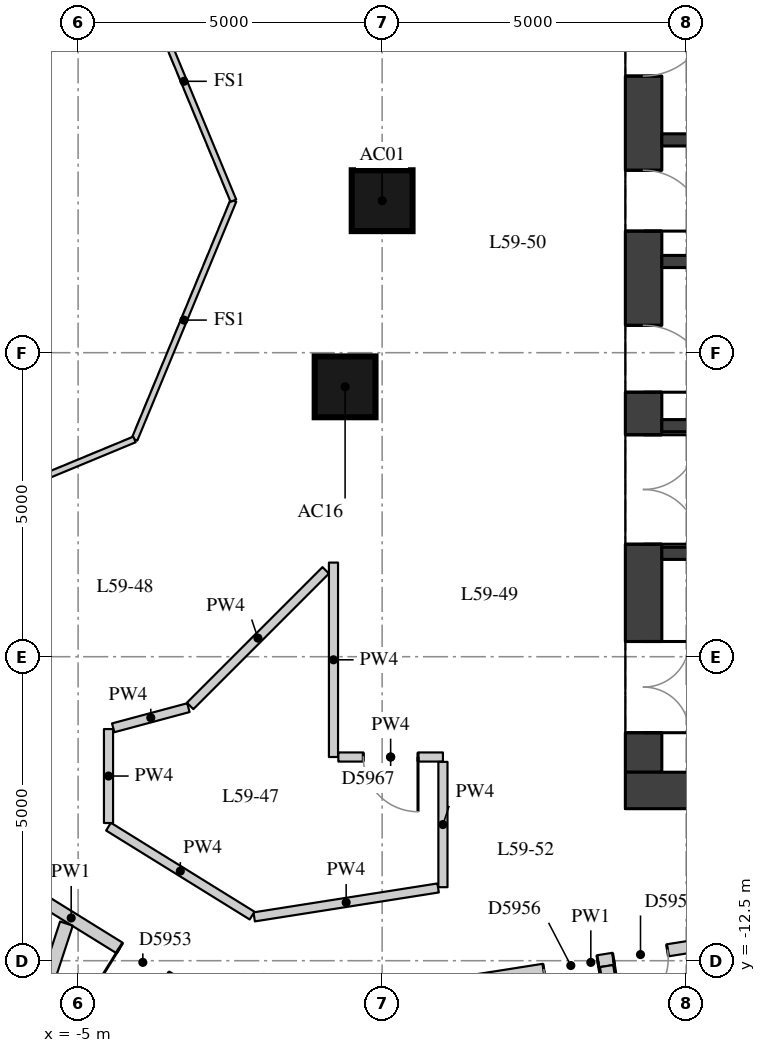
"""IFC4 building model, lengths in metres.
Left out: names, types, materials, properties, quantities, classifications, styles, units other than length and angle.
Written with IfcOpenShell. Run it as: python <this file> out.ifc"""

import sys

from ifc_helpers import new_model, si_unit, direction, frame, frame_2d, origin, origin_2d, place, context, subcontext, project, spatial, rectangle, extrude, element, fill, save


model = new_model("IFC4")
c1 = context("Model", 3, precision=1e-05, world=origin(), true_north=direction((0.0, 1.0)))
c2 = subcontext(c1, "Body", "Model", "MODEL_VIEW")
j1 = project(units=[si_unit("LENGTHUNIT", "METRE"), si_unit("PLANEANGLEUNIT", "RADIAN")], contexts=[c1])
p1 = place(None, origin())
s1 = spatial("IfcSite", under=j1, at=p1, CompositionType="ELEMENT")
p2 = place(p1, origin())
s2 = spatial("IfcBuilding", under=s1, at=p2, CompositionType="ELEMENT")
p3 = place(p2, frame((0.0, 0.0, 209.0)))
s3 = spatial("IfcBuildingStorey", under=s2, at=p3, CompositionType="ELEMENT", Elevation=209.0)
for number, where, z_axis, x_axis in (
    (1, (0.0, 0.0, 0.0), (0.0, 0.0, 1.0), (1.0, 0.0, 0.0)),
    (2, (-0.609, -3.062, 0.0), (0.0, 0.0, 1.0), (1.0, 0.0, 0.0)),
):
    element("IfcColumn", number, at=place(p3, frame(where, z_axis=z_axis, x_axis=x_axis)), inside=s3, PredefinedType="COLUMN", context=c2, shape_type="SweptSolid", body=[
        extrude(rectangle(XDim=1.0, YDim=1.0, at=origin_2d()), origin(), (0.0, 0.0, 1.0), 3.3),
    ])
p4 = place(p3, frame((4.3, -9.4, 0.0), z_axis=(0.0, 0.0, 1.0), x_axis=(0.0, 1.0, 0.0)))
e3 = element("IfcWall", 3, at=p4, inside=s3, PredefinedType="SHEAR", context=c2, shape_type="SweptSolid", body=[
    extrude(rectangle(XDim=18.8, YDim=0.6, at=frame_2d((9.4, 0.0))), origin(), (0.0, 0.0, 1.0), 3.02),
])
p5 = place(p4, frame((0.65, 0.0, 0.0)))
e4 = element("IfcOpeningElement", 4, at=p5, cuts=e3, PredefinedType="OPENING", context=c2, shape_type="SweptSolid", body=[
    extrude(rectangle(XDim=1.5, YDim=2.1, at=frame_2d((0.75, 1.05))), frame((0.0, 0.31, 0.0), z_axis=(0.0, -1.0, 0.0), x_axis=(1.0, 0.0, 0.0)), (0.0, 0.0, 1.0), 0.62),
])
p6 = place(p4, frame((3.75, 0.0, 0.0)))
e5 = element("IfcOpeningElement", 5, at=p6, cuts=e3, PredefinedType="OPENING", context=c2, shape_type="SweptSolid", body=[
    extrude(rectangle(XDim=1.8, YDim=2.1, at=frame_2d((0.9, 1.05))), frame((0.0, 0.31, 0.0), z_axis=(0.0, -1.0, 0.0), x_axis=(1.0, 0.0, 0.0)), (0.0, 0.0, 1.0), 0.62),
])
p7 = place(p4, frame((6.25, 0.0, 0.0)))
e6 = element("IfcOpeningElement", 6, at=p7, cuts=e3, PredefinedType="OPENING", context=c2, shape_type="SweptSolid", body=[
    extrude(rectangle(XDim=1.1, YDim=2.1, at=frame_2d((0.55, 1.05))), frame((0.0, 0.31, 0.0), z_axis=(0.0, -1.0, 0.0), x_axis=(1.0, 0.0, 0.0)), (0.0, 0.0, 1.0), 0.62),
])
p8 = place(p4, frame((8.9, 0.0, 0.0)))
e7 = element("IfcOpeningElement", 7, at=p8, cuts=e3, PredefinedType="OPENING", context=c2, shape_type="SweptSolid", body=[
    extrude(rectangle(XDim=1.0, YDim=2.1, at=frame_2d((0.5, 1.05))), frame((0.0, 0.31, 0.0), z_axis=(0.0, -1.0, 0.0), x_axis=(1.0, 0.0, 0.0)), (0.0, 0.0, 1.0), 0.62),
])
p9 = place(p4, frame((11.45, 0.0, 0.0)))
e8 = element("IfcOpeningElement", 8, at=p9, cuts=e3, PredefinedType="OPENING", context=c2, shape_type="SweptSolid", body=[
    extrude(rectangle(XDim=1.1, YDim=2.1, at=frame_2d((0.55, 1.05))), frame((0.0, 0.31, 0.0), z_axis=(0.0, -1.0, 0.0), x_axis=(1.0, 0.0, 0.0)), (0.0, 0.0, 1.0), 0.62),
])
p10 = place(p4, frame((13.25, 0.0, 0.0)))
e9 = element("IfcOpeningElement", 9, at=p10, cuts=e3, PredefinedType="OPENING", context=c2, shape_type="SweptSolid", body=[
    extrude(rectangle(XDim=1.8, YDim=2.1, at=frame_2d((0.9, 1.05))), frame((0.0, 0.31, 0.0), z_axis=(0.0, -1.0, 0.0), x_axis=(1.0, 0.0, 0.0)), (0.0, 0.0, 1.0), 0.62),
])
p11 = place(p4, frame((16.65, 0.0, 0.0)))
e10 = element("IfcOpeningElement", 10, at=p11, cuts=e3, PredefinedType="OPENING", context=c2, shape_type="SweptSolid", body=[
    extrude(rectangle(XDim=1.5, YDim=2.1, at=frame_2d((0.75, 1.05))), frame((0.0, 0.31, 0.0), z_axis=(0.0, -1.0, 0.0), x_axis=(1.0, 0.0, 0.0)), (0.0, 0.0, 1.0), 0.62),
])
p12 = place(p3, frame((4.0, -9.7, 0.0), z_axis=(0.0, 0.0, 1.0), x_axis=(1.0, 0.0, 0.0)))
e11 = element("IfcWall", 11, at=p12, inside=s3, PredefinedType="SHEAR", context=c2, shape_type="SweptSolid", body=[
    extrude(rectangle(XDim=12.0, YDim=0.6, at=frame_2d((6.0, 0.0))), origin(), (0.0, 0.0, 1.0), 3.02),
])
for number, where, z_axis, x_axis in (
    (12, (4.6, 1.0, 0.0), (0.0, 0.0, 1.0), (1.0, 0.0, 0.0)),
    (13, (4.6, -1.0, 0.0), (0.0, 0.0, 1.0), (1.0, 0.0, 0.0)),
):
    element("IfcWall", number, at=place(p3, frame(where, z_axis=z_axis, x_axis=x_axis)), inside=s3, PredefinedType="SHEAR", context=c2, shape_type="SweptSolid", body=[
        extrude(rectangle(XDim=10.8, YDim=0.2, at=frame_2d((5.4, 0.0))), origin(), (0.0, 0.0, 1.0), 3.02),
    ])
p13 = place(p3, frame((4.6, -3.7, 0.0), z_axis=(0.0, 0.0, 1.0), x_axis=(1.0, 0.0, 0.0)))
e14 = element("IfcWall", 14, at=p13, inside=s3, PredefinedType="SHEAR", context=c2, shape_type="SweptSolid", body=[
    extrude(rectangle(XDim=10.8, YDim=0.2, at=frame_2d((5.4, 0.0))), origin(), (0.0, 0.0, 1.0), 3.02),
])
p14 = place(p13, frame((6.6, 0.0, 0.0)))
e15 = element("IfcOpeningElement", 15, at=p14, cuts=e14, PredefinedType="OPENING", context=c2, shape_type="SweptSolid", body=[
    extrude(rectangle(XDim=1.1, YDim=2.1, at=frame_2d((0.55, 1.05))), frame((0.0, 0.11, 0.0), z_axis=(0.0, -1.0, 0.0), x_axis=(1.0, 0.0, 0.0)), (0.0, 0.0, 1.0), 0.22),
])
p15 = place(p13, frame((8.9, 0.0, 0.0)))
e16 = element("IfcOpeningElement", 16, at=p15, cuts=e14, PredefinedType="OPENING", context=c2, shape_type="SweptSolid", body=[
    extrude(rectangle(XDim=1.1, YDim=2.1, at=frame_2d((0.55, 1.05))), frame((0.0, 0.11, 0.0), z_axis=(0.0, -1.0, 0.0), x_axis=(1.0, 0.0, 0.0)), (0.0, 0.0, 1.0), 0.22),
])
p16 = place(p3, frame((4.6, -5.8, 0.0), z_axis=(0.0, 0.0, 1.0), x_axis=(1.0, 0.0, 0.0)))
e17 = element("IfcWall", 17, at=p16, inside=s3, PredefinedType="SHEAR", context=c2, shape_type="SweptSolid", body=[
    extrude(rectangle(XDim=10.8, YDim=0.2, at=frame_2d((5.4, 0.0))), origin(), (0.0, 0.0, 1.0), 3.02),
])
p17 = place(p3, frame((9.306, -11.603, 0.0), z_axis=(0.0, 0.0, 1.0), x_axis=(-0.987842562114, -0.155457622769, 0.0)))
e18 = element("IfcWall", 18, at=p17, inside=s3, PredefinedType="PARTITIONING", context=c2, shape_type="SweptSolid", body=[
    extrude(rectangle(XDim=11.893, YDim=0.2, at=frame_2d((5.947, 0.0))), origin(), (0.0, 0.0, 1.0), 3.02),
])
p18 = place(p17, frame((10.607, 0.0, 0.0)))
e19 = element("IfcOpeningElement", 19, at=p18, cuts=e18, PredefinedType="OPENING", context=c2, shape_type="SweptSolid", body=[
    extrude(rectangle(XDim=0.9, YDim=2.1, at=frame_2d((0.45, 1.05))), frame((0.0, 0.11, 0.0), z_axis=(0.0, -1.0, 0.0), x_axis=(1.0, 0.0, 0.0)), (0.0, 0.0, 1.0), 0.22),
])
p19 = place(p17, frame((5.829, 0.0, 0.0)))
e20 = element("IfcOpeningElement", 20, at=p19, cuts=e18, PredefinedType="OPENING", context=c2, shape_type="SweptSolid", body=[
    extrude(rectangle(XDim=0.9, YDim=2.1, at=frame_2d((0.45, 1.05))), frame((0.0, 0.11, 0.0), z_axis=(0.0, -1.0, 0.0), x_axis=(1.0, 0.0, 0.0)), (0.0, 0.0, 1.0), 0.22),
])
p20 = place(p17, frame((4.669, 0.0, 0.0)))
e21 = element("IfcOpeningElement", 21, at=p20, cuts=e18, PredefinedType="OPENING", context=c2, shape_type="SweptSolid", body=[
    extrude(rectangle(XDim=0.9, YDim=2.1, at=frame_2d((0.45, 1.05))), frame((0.0, 0.11, 0.0), z_axis=(0.0, -1.0, 0.0), x_axis=(1.0, 0.0, 0.0)), (0.0, 0.0, 1.0), 0.22),
])
p21 = place(p17, frame((0.14, 0.0, 0.0)))
e22 = element("IfcOpeningElement", 22, at=p21, cuts=e18, PredefinedType="OPENING", context=c2, shape_type="SweptSolid", body=[
    extrude(rectangle(XDim=1.1, YDim=2.1, at=frame_2d((0.55, 1.05))), frame((0.0, 0.11, 0.0), z_axis=(0.0, -1.0, 0.0), x_axis=(1.0, 0.0, 0.0)), (0.0, 0.0, 1.0), 0.22),
])
p22 = place(p3, frame((-2.528, -13.4, 0.0), z_axis=(0.0, 0.0, 1.0), x_axis=(-0.850088088191, 0.526640524757, 0.0)))
e23 = element("IfcWall", 23, at=p22, inside=s3, PredefinedType="PARTITIONING", context=c2, shape_type="SweptSolid", body=[
    extrude(rectangle(XDim=6.084, YDim=0.2, at=frame_2d((3.042, 0.0))), origin(), (0.0, 0.0, 1.0), 3.02),
])
p23 = place(p22, frame((4.031, 0.0, 0.0)))
e24 = element("IfcOpeningElement", 24, at=p23, cuts=e23, PredefinedType="OPENING", context=c2, shape_type="SweptSolid", body=[
    extrude(rectangle(XDim=1.1, YDim=2.1, at=frame_2d((0.55, 1.05))), frame((0.0, 0.11, 0.0), z_axis=(0.0, -1.0, 0.0), x_axis=(1.0, 0.0, 0.0)), (0.0, 0.0, 1.0), 0.22),
])
p24 = place(p22, frame((1.206, 0.0, 0.0)))
e25 = element("IfcOpeningElement", 25, at=p24, cuts=e23, PredefinedType="OPENING", context=c2, shape_type="SweptSolid", body=[
    extrude(rectangle(XDim=0.9, YDim=2.1, at=frame_2d((0.45, 1.05))), frame((0.0, 0.11, 0.0), z_axis=(0.0, -1.0, 0.0), x_axis=(1.0, 0.0, 0.0)), (0.0, 0.0, 1.0), 0.22),
])
p25 = place(p3, frame((-0.8, -5.952, 0.0), z_axis=(0.0, 0.0, 1.0), x_axis=(0.0, -1.0, 0.0)))
e26 = element("IfcWall", 26, at=p25, inside=s3, PredefinedType="PARTITIONING", context=c2, shape_type="SweptSolid", body=[
    extrude(rectangle(XDim=3.198, YDim=0.15, at=frame_2d((1.599, 0.0))), origin(), (0.0, 0.0, 1.0), 3.02),
])
p26 = place(p3, frame((-0.72, -9.15, 0.0), z_axis=(0.0, 0.0, 1.0), x_axis=(1.0, 0.0, 0.0)))
e27 = element("IfcWall", 27, at=p26, inside=s3, PredefinedType="PARTITIONING", context=c2, shape_type="SweptSolid", body=[
    extrude(rectangle(XDim=1.72, YDim=0.15, at=frame_2d((0.86, 0.0))), origin(), (0.0, 0.0, 1.0), 3.02),
])
p27 = place(p26, frame((0.41, 0.0, 0.0)))
e28 = element("IfcOpeningElement", 28, at=p27, cuts=e27, PredefinedType="OPENING", context=c2, shape_type="SweptSolid", body=[
    extrude(rectangle(XDim=0.9, YDim=2.1, at=frame_2d((0.45, 1.05))), frame((0.0, 0.085, 0.0), z_axis=(0.0, -1.0, 0.0), x_axis=(1.0, 0.0, 0.0)), (0.0, 0.0, 1.0), 0.17),
])
p28 = place(p3, frame((1.0, -9.23, 0.0), z_axis=(0.0, 0.0, 1.0), x_axis=(0.0, -1.0, 0.0)))
e29 = element("IfcWall", 29, at=p28, inside=s3, PredefinedType="PARTITIONING", context=c2, shape_type="SweptSolid", body=[
    extrude(rectangle(XDim=2.061, YDim=0.15, at=frame_2d((1.03, 0.0))), origin(), (0.0, 0.0, 1.0), 3.02),
])
p29 = place(p3, frame((0.921, -11.303, 0.0), z_axis=(0.0, 0.0, 1.0), x_axis=(-0.987854584084, -0.15538121091, 0.0)))
e30 = element("IfcWall", 30, at=p29, inside=s3, PredefinedType="PARTITIONING", context=c2, shape_type="SweptSolid", body=[
    extrude(rectangle(XDim=3.062, YDim=0.15, at=frame_2d((1.531, 0.0))), origin(), (0.0, 0.0, 1.0), 3.02),
])
p30 = place(p3, frame((-2.138, -11.758, 0.0), z_axis=(0.0, 0.0, 1.0), x_axis=(-0.850109654363, 0.526605711666, 0.0)))
e31 = element("IfcWall", 31, at=p30, inside=s3, PredefinedType="PARTITIONING", context=c2, shape_type="SweptSolid", body=[
    extrude(rectangle(XDim=2.778, YDim=0.15, at=frame_2d((1.389, 0.0))), origin(), (0.0, 0.0, 1.0), 3.02),
])
p31 = place(p3, frame((-4.5, -10.235, 0.0), z_axis=(0.0, 0.0, 1.0), x_axis=(0.0, 1.0, 0.0)))
e32 = element("IfcWall", 32, at=p31, inside=s3, PredefinedType="PARTITIONING", context=c2, shape_type="SweptSolid", body=[
    extrude(rectangle(XDim=1.545, YDim=0.15, at=frame_2d((0.772, 0.0))), origin(), (0.0, 0.0, 1.0), 3.02),
])
p32 = place(p3, frame((-4.423, -8.67, 0.0), z_axis=(0.0, 0.0, 1.0), x_axis=(0.965898680525, 0.258920333232, 0.0)))
e33 = element("IfcWall", 33, at=p32, inside=s3, PredefinedType="PARTITIONING", context=c2, shape_type="SweptSolid", body=[
    extrude(rectangle(XDim=1.281, YDim=0.15, at=frame_2d((0.64, 0.0))), origin(), (0.0, 0.0, 1.0), 3.02),
])
p33 = place(p3, frame((-3.158, -8.31, 0.0), z_axis=(0.0, 0.0, 1.0), x_axis=(0.707106781187, 0.707106781187, 0.0)))
e34 = element("IfcWall", 34, at=p33, inside=s3, PredefinedType="PARTITIONING", context=c2, shape_type="SweptSolid", body=[
    extrude(rectangle(XDim=3.154, YDim=0.15, at=frame_2d((1.577, 0.0))), origin(), (0.0, 0.0, 1.0), 3.02),
])
p34 = place(p3, frame((-7.508, -18.944, 0.0), z_axis=(0.0, 0.0, 1.0), x_axis=(0.311962912662, 0.950094280124, 0.0)))
e35 = element("IfcWall", 35, at=p34, inside=s3, PredefinedType="PARTITIONING", context=c2, shape_type="SweptSolid", body=[
    extrude(rectangle(XDim=7.425, YDim=0.22, at=frame_2d((3.712, 0.0))), origin(), (0.0, 0.0, 1.0), 3.02),
])
p35 = place(p3, frame((5.071, -21.256, 0.0), z_axis=(0.0, 0.0, 1.0), x_axis=(-0.157132312818, 0.987577559622, 0.0)))
e36 = element("IfcWall", 36, at=p35, inside=s3, PredefinedType="PARTITIONING", context=c2, shape_type="SweptSolid", body=[
    extrude(rectangle(XDim=8.777, YDim=0.22, at=frame_2d((4.389, 0.0))), origin(), (0.0, 0.0, 1.0), 3.02),
])
for number, where, z_axis, x_axis in (
    (37, (-2.446, 0.0, 0.0), (0.0, 0.0, 1.0), (-0.383, -0.924, 0.0)),
    (38, (-4.073, -3.927, 0.0), (0.0, 0.0, 1.0), (-0.924, -0.383, 0.0)),
    (39, (-4.073, 3.927, 0.0), (0.0, 0.0, 1.0), (0.383, -0.924, 0.0)),
):
    element("IfcWall", number, at=place(p3, frame(where, z_axis=z_axis, x_axis=x_axis)), inside=s3, PredefinedType="PARTITIONING", context=c2, shape_type="SweptSolid", body=[
        extrude(rectangle(XDim=4.251, YDim=0.1, at=frame_2d((2.125, 0.0))), origin(), (0.0, 0.0, 1.0), 3.02),
    ])
p36 = place(p5, origin())
e40 = element("IfcDoor", 40, at=p36, inside=s3, OperationType="DOUBLE_DOOR_SINGLE_SWING", PredefinedType="DOOR", context=c2, shape_type="SweptSolid", body=[
    extrude(rectangle(XDim=1.5, YDim=2.1, at=frame_2d((0.75, 1.05))), frame((0.0, 0.025, 0.0), z_axis=(0.0, -1.0, 0.0), x_axis=(1.0, 0.0, 0.0)), (0.0, 0.0, 1.0), 0.05),
])
fill(e4, e40)
p37 = place(p6, origin())
e41 = element("IfcDoor", 41, at=p37, inside=s3, OperationType="DOUBLE_DOOR_SINGLE_SWING", PredefinedType="DOOR", context=c2, shape_type="SweptSolid", body=[
    extrude(rectangle(XDim=1.8, YDim=2.1, at=frame_2d((0.9, 1.05))), frame((0.0, 0.025, 0.0), z_axis=(0.0, -1.0, 0.0), x_axis=(1.0, 0.0, 0.0)), (0.0, 0.0, 1.0), 0.05),
])
fill(e5, e41)
p38 = place(p7, origin())
e42 = element("IfcDoor", 42, at=p38, inside=s3, OperationType="SINGLE_SWING_RIGHT", PredefinedType="DOOR", context=c2, shape_type="SweptSolid", body=[
    extrude(rectangle(XDim=1.1, YDim=2.1, at=frame_2d((0.55, 1.05))), frame((0.0, 0.025, 0.0), z_axis=(0.0, -1.0, 0.0), x_axis=(1.0, 0.0, 0.0)), (0.0, 0.0, 1.0), 0.05),
])
fill(e6, e42)
p39 = place(p8, origin())
e43 = element("IfcDoor", 43, at=p39, inside=s3, OperationType="SINGLE_SWING_RIGHT", PredefinedType="DOOR", context=c2, shape_type="SweptSolid", body=[
    extrude(rectangle(XDim=1.0, YDim=2.1, at=frame_2d((0.5, 1.05))), frame((0.0, 0.025, 0.0), z_axis=(0.0, -1.0, 0.0), x_axis=(1.0, 0.0, 0.0)), (0.0, 0.0, 1.0), 0.05),
])
fill(e7, e43)
p40 = place(p9, origin())
e44 = element("IfcDoor", 44, at=p40, inside=s3, OperationType="SINGLE_SWING_LEFT", PredefinedType="DOOR", context=c2, shape_type="SweptSolid", body=[
    extrude(rectangle(XDim=1.1, YDim=2.1, at=frame_2d((0.55, 1.05))), frame((0.0, 0.025, 0.0), z_axis=(0.0, -1.0, 0.0), x_axis=(1.0, 0.0, 0.0)), (0.0, 0.0, 1.0), 0.05),
])
fill(e8, e44)
p41 = place(p24, origin())
e45 = element("IfcDoor", 45, at=p41, inside=s3, OperationType="SINGLE_SWING_RIGHT", PredefinedType="DOOR", context=c2, shape_type="SweptSolid", body=[
    extrude(rectangle(XDim=0.9, YDim=2.1, at=frame_2d((0.45, 1.05))), frame((0.0, 0.025, 0.0), z_axis=(0.0, -1.0, 0.0), x_axis=(1.0, 0.0, 0.0)), (0.0, 0.0, 1.0), 0.05),
])
fill(e25, e45)
p42 = place(p19, origin())
e46 = element("IfcDoor", 46, at=p42, inside=s3, OperationType="SINGLE_SWING_LEFT", PredefinedType="DOOR", context=c2, shape_type="SweptSolid", body=[
    extrude(rectangle(XDim=0.9, YDim=2.1, at=frame_2d((0.45, 1.05))), frame((0.0, 0.025, 0.0), z_axis=(0.0, -1.0, 0.0), x_axis=(1.0, 0.0, 0.0)), (0.0, 0.0, 1.0), 0.05),
])
fill(e20, e46)
p43 = place(p20, origin())
e47 = element("IfcDoor", 47, at=p43, inside=s3, OperationType="SINGLE_SWING_RIGHT", PredefinedType="DOOR", context=c2, shape_type="SweptSolid", body=[
    extrude(rectangle(XDim=0.9, YDim=2.1, at=frame_2d((0.45, 1.05))), frame((0.0, 0.025, 0.0), z_axis=(0.0, -1.0, 0.0), x_axis=(1.0, 0.0, 0.0)), (0.0, 0.0, 1.0), 0.05),
])
fill(e21, e47)
p44 = place(p27, origin())
e48 = element("IfcDoor", 48, at=p44, inside=s3, OperationType="SINGLE_SWING_LEFT", PredefinedType="DOOR", context=c2, shape_type="SweptSolid", body=[
    extrude(rectangle(XDim=0.9, YDim=2.1, at=frame_2d((0.45, 1.05))), frame((0.0, 0.025, 0.0), z_axis=(0.0, -1.0, 0.0), x_axis=(1.0, 0.0, 0.0)), (0.0, 0.0, 1.0), 0.05),
])
fill(e28, e48)
save(model, sys.argv[1])
